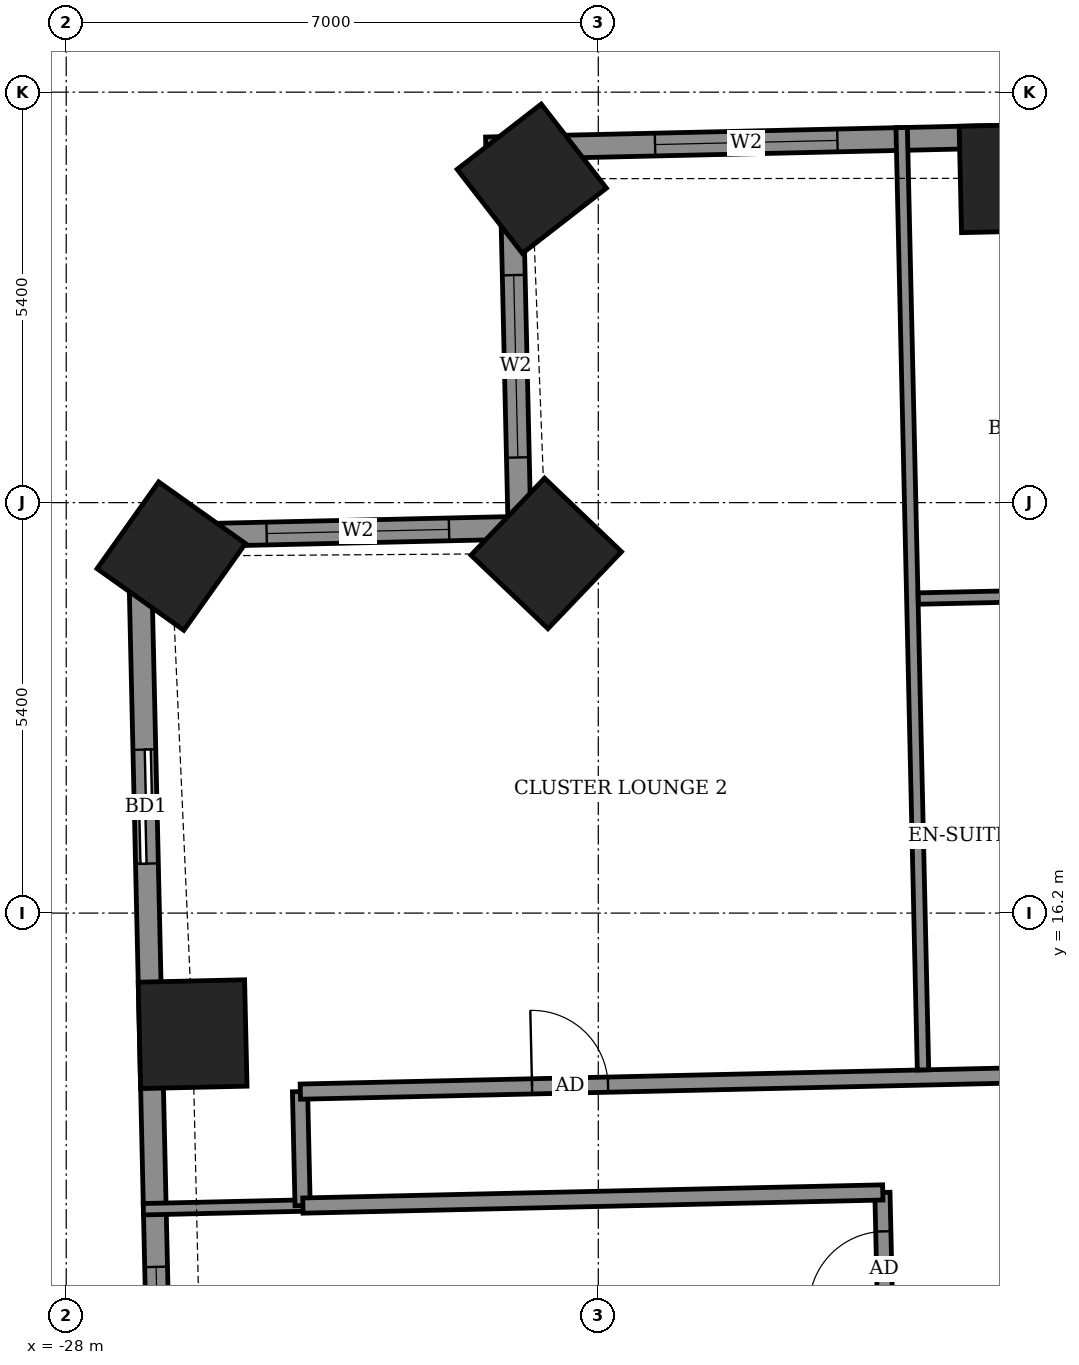
"""IFC4 building model, lengths in metres.
Left out: names, types, materials, properties, quantities, classifications, styles, units other than length and angle.
Written with IfcOpenShell. Run it as: python <this file> out.ifc"""

import sys

from ifc_helpers import new_model, si_unit, direction, frame, frame_2d, origin, origin_2d, place, context, subcontext, project, spatial, rectangle, extrude, element, fill, save


model = new_model("IFC4")
c1 = context("Model", 3, precision=1e-05, world=origin(), true_north=direction((0.0, 1.0)))
c2 = subcontext(c1, "Body", "Model", "MODEL_VIEW")
j1 = project(units=[si_unit("LENGTHUNIT", "METRE"), si_unit("PLANEANGLEUNIT", "RADIAN")], contexts=[c1])
p1 = place(None, origin())
s1 = spatial("IfcSite", under=j1, at=p1, CompositionType="ELEMENT")
p2 = place(p1, origin())
s2 = spatial("IfcBuilding", under=s1, at=p2, CompositionType="ELEMENT")
p3 = place(p2, frame((0.0, 0.0, 93.7)))
s3 = spatial("IfcBuildingStorey", under=s2, at=p3, CompositionType="ELEMENT", Elevation=93.7)
for number, where, z_axis, x_axis in (
    (1, (-15.537, 25.867, -0.55), (0.0, 0.0, 1.0), (-1.0, -0.023, 0.0)),
    (2, (-21.875, 25.861, -0.55), (0.0, 0.0, 1.0), (-0.79, -0.613, 0.0)),
    (3, (-21.685, 20.931, -0.55), (0.0, 0.0, 1.0), (-0.691, -0.723, 0.0)),
    (4, (-26.618, 20.897, -0.55), (0.0, 0.0, 1.0), (-0.579, -0.815, 0.0)),
    (5, (-26.337, 14.607, -0.55), (0.0, 0.0, 1.0), (0.023, -1.0, 0.0)),
):
    element("IfcColumn", number, at=place(p3, frame(where, z_axis=z_axis, x_axis=x_axis)), inside=s3, PredefinedType="COLUMN", context=c2, shape_type="SweptSolid", body=[
        extrude(rectangle(XDim=1.4, YDim=1.4, at=origin_2d()), origin(), (0.0, 0.0, 1.0), 3.6),
    ])
p4 = place(p3, frame((24.809, 27.333, 0.0), z_axis=(0.0, 0.0, 1.0), x_axis=(-0.999742676884, -0.022684356233, 0.0)))
e6 = element("IfcWall", 6, at=p4, inside=s3, PredefinedType="SOLIDWALL", context=c2, shape_type="SweptSolid", body=[
    extrude(rectangle(XDim=47.301, YDim=0.3, at=frame_2d((23.651, 0.0))), origin(), (0.0, 0.0, 1.0), 3.05),
])
p5 = place(p4, frame((1.311, 0.0, 0.0)))
e7 = element("IfcOpeningElement", 7, at=p5, cuts=e6, PredefinedType="OPENING", context=c2, shape_type="SweptSolid", body=[
    extrude(rectangle(XDim=1.2, YDim=2.4, at=frame_2d((0.6, 1.2))), frame((0.0, 0.16, 0.0), z_axis=(0.0, -1.0, 0.0), x_axis=(1.0, 0.0, 0.0)), (0.0, 0.0, 1.0), 0.32),
])
p6 = place(p4, frame((3.763, 0.0, 0.0)))
e8 = element("IfcOpeningElement", 8, at=p6, cuts=e6, PredefinedType="OPENING", context=c2, shape_type="SweptSolid", body=[
    extrude(rectangle(XDim=1.5, YDim=2.4, at=frame_2d((0.75, 1.2))), frame((0.0, 0.16, 0.0), z_axis=(0.0, -1.0, 0.0), x_axis=(1.0, 0.0, 0.0)), (0.0, 0.0, 1.0), 0.32),
])
p7 = place(p4, frame((8.647, 0.0, 0.0)))
e9 = element("IfcOpeningElement", 9, at=p7, cuts=e6, PredefinedType="OPENING", context=c2, shape_type="SweptSolid", body=[
    extrude(rectangle(XDim=1.5, YDim=2.4, at=frame_2d((0.75, 1.2))), frame((0.0, 0.16, 0.0), z_axis=(0.0, -1.0, 0.0), x_axis=(1.0, 0.0, 0.0)), (0.0, 0.0, 1.0), 0.32),
])
p8 = place(p4, frame((14.239, 0.0, 0.0)))
e10 = element("IfcOpeningElement", 10, at=p8, cuts=e6, PredefinedType="OPENING", context=c2, shape_type="SweptSolid", body=[
    extrude(rectangle(XDim=1.2, YDim=2.4, at=frame_2d((0.6, 1.2))), frame((0.0, 0.16, 0.0), z_axis=(0.0, -1.0, 0.0), x_axis=(1.0, 0.0, 0.0)), (0.0, 0.0, 1.0), 0.32),
])
p9 = place(p4, frame((17.016, 0.0, 0.0)))
e11 = element("IfcOpeningElement", 11, at=p9, cuts=e6, PredefinedType="OPENING", context=c2, shape_type="SweptSolid", body=[
    extrude(rectangle(XDim=1.5, YDim=2.4, at=frame_2d((0.75, 1.2))), frame((0.0, 0.16, 0.0), z_axis=(0.0, -1.0, 0.0), x_axis=(1.0, 0.0, 0.0)), (0.0, 0.0, 1.0), 0.32),
])
p10 = place(p4, frame((21.816, 0.0, 0.0)))
e12 = element("IfcOpeningElement", 12, at=p10, cuts=e6, PredefinedType="OPENING", context=c2, shape_type="SweptSolid", body=[
    extrude(rectangle(XDim=1.5, YDim=2.4, at=frame_2d((0.75, 1.2))), frame((0.0, 0.16, 0.0), z_axis=(0.0, -1.0, 0.0), x_axis=(1.0, 0.0, 0.0)), (0.0, 0.0, 1.0), 0.32),
])
p11 = place(p4, frame((24.817, 0.0, 0.0)))
e13 = element("IfcOpeningElement", 13, at=p11, cuts=e6, PredefinedType="OPENING", context=c2, shape_type="SweptSolid", body=[
    extrude(rectangle(XDim=1.2, YDim=2.4, at=frame_2d((0.6, 1.2))), frame((0.0, 0.16, 0.0), z_axis=(0.0, -1.0, 0.0), x_axis=(1.0, 0.0, 0.0)), (0.0, 0.0, 1.0), 0.32),
])
p12 = place(p4, frame((30.244, 0.0, 0.0)))
e14 = element("IfcOpeningElement", 14, at=p12, cuts=e6, PredefinedType="OPENING", context=c2, shape_type="SweptSolid", body=[
    extrude(rectangle(XDim=1.5, YDim=2.4, at=frame_2d((0.75, 1.2))), frame((0.0, 0.16, 0.0), z_axis=(0.0, -1.0, 0.0), x_axis=(1.0, 0.0, 0.0)), (0.0, 0.0, 1.0), 0.32),
])
p13 = place(p4, frame((35.069, 0.0, 0.0)))
e15 = element("IfcOpeningElement", 15, at=p13, cuts=e6, PredefinedType="OPENING", context=c2, shape_type="SweptSolid", body=[
    extrude(rectangle(XDim=1.5, YDim=2.4, at=frame_2d((0.75, 1.2))), frame((0.0, 0.16, 0.0), z_axis=(0.0, -1.0, 0.0), x_axis=(1.0, 0.0, 0.0)), (0.0, 0.0, 1.0), 0.32),
])
p14 = place(p4, frame((37.995, 0.0, 0.0)))
e16 = element("IfcOpeningElement", 16, at=p14, cuts=e6, PredefinedType="OPENING", context=c2, shape_type="SweptSolid", body=[
    extrude(rectangle(XDim=1.5, YDim=2.4, at=frame_2d((0.75, 1.2))), frame((0.0, 0.16, 0.0), z_axis=(0.0, -1.0, 0.0), x_axis=(1.0, 0.0, 0.0)), (0.0, 0.0, 1.0), 0.32),
])
p15 = place(p4, frame((42.674, 0.0, 0.9)))
e17 = element("IfcOpeningElement", 17, at=p15, cuts=e6, PredefinedType="OPENING", context=c2, shape_type="SweptSolid", body=[
    extrude(rectangle(XDim=2.4, YDim=1.5, at=frame_2d((1.2, 0.75))), frame((0.0, 0.16, 0.0), z_axis=(0.0, -1.0, 0.0), x_axis=(1.0, 0.0, 0.0)), (0.0, 0.0, 1.0), 0.32),
])
p16 = place(p3, frame((-22.151, 26.267, 0.0), z_axis=(0.0, 0.0, 1.0), x_axis=(0.022756903044, -0.999741028149, 0.0)))
e18 = element("IfcWall", 18, at=p16, inside=s3, PredefinedType="SOLIDWALL", context=c2, shape_type="SweptSolid", body=[
    extrude(rectangle(XDim=4.999, YDim=0.3, at=frame_2d((2.5, 0.0))), origin(), (0.0, 0.0, 1.0), 2.55),
])
p17 = place(p16, frame((1.674, 0.0, 0.9)))
e19 = element("IfcOpeningElement", 19, at=p17, cuts=e18, PredefinedType="OPENING", context=c2, shape_type="SweptSolid", body=[
    extrude(rectangle(XDim=2.4, YDim=1.5, at=frame_2d((1.2, 0.75))), frame((0.0, 0.16, 0.0), z_axis=(0.0, -1.0, 0.0), x_axis=(1.0, 0.0, 0.0)), (0.0, 0.0, 1.0), 0.32),
])
p18 = place(p3, frame((-22.037, 21.269, 0.0), z_axis=(0.0, 0.0, 1.0), x_axis=(-0.999739992103, -0.022802372469, 0.0)))
e20 = element("IfcWall", 20, at=p18, inside=s3, PredefinedType="SOLIDWALL", context=c2, shape_type="SweptSolid", body=[
    extrude(rectangle(XDim=5.0, YDim=0.3, at=frame_2d((2.5, 0.0))), origin(), (0.0, 0.0, 1.0), 2.55),
])
p19 = place(p18, frame((0.927, 0.0, 0.9)))
e21 = element("IfcOpeningElement", 21, at=p19, cuts=e20, PredefinedType="OPENING", context=c2, shape_type="SweptSolid", body=[
    extrude(rectangle(XDim=2.4, YDim=1.5, at=frame_2d((1.2, 0.75))), frame((0.0, 0.16, 0.0), z_axis=(0.0, -1.0, 0.0), x_axis=(1.0, 0.0, 0.0)), (0.0, 0.0, 1.0), 0.32),
])
p20 = place(p3, frame((-27.036, 21.155, 0.0), z_axis=(0.0, 0.0, 1.0), x_axis=(0.022730142562, -0.999741636934, 0.0)))
e22 = element("IfcWall", 22, at=p20, inside=s3, PredefinedType="SOLIDWALL", context=c2, shape_type="SweptSolid", body=[
    extrude(rectangle(XDim=13.329, YDim=0.3, at=frame_2d((6.665, 0.0))), origin(), (0.0, 0.0, 1.0), 3.05),
])
p21 = place(p20, frame((2.805, 0.0, 0.0)))
e23 = element("IfcOpeningElement", 23, at=p21, cuts=e22, PredefinedType="OPENING", context=c2, shape_type="SweptSolid", body=[
    extrude(rectangle(XDim=1.5, YDim=2.4, at=frame_2d((0.75, 1.2))), frame((0.0, 0.16, 0.0), z_axis=(0.0, -1.0, 0.0), x_axis=(1.0, 0.0, 0.0)), (0.0, 0.0, 1.0), 0.32),
])
p22 = place(p20, frame((9.612, 0.0, 0.9)))
e24 = element("IfcOpeningElement", 24, at=p22, cuts=e22, PredefinedType="OPENING", context=c2, shape_type="SweptSolid", body=[
    extrude(rectangle(XDim=2.4, YDim=1.5, at=frame_2d((1.2, 0.75))), frame((0.0, 0.16, 0.0), z_axis=(0.0, -1.0, 0.0), x_axis=(1.0, 0.0, 0.0)), (0.0, 0.0, 1.0), 0.32),
])
p23 = place(p3, frame((-16.684, -12.919, 0.0), z_axis=(0.0, 0.0, 1.0), x_axis=(-0.022706151961, 0.999742182097, 0.0)))
e25 = element("IfcWall", 25, at=p23, inside=s3, PredefinedType="PARTITIONING", context=c2, shape_type="SweptSolid", body=[
    extrude(rectangle(XDim=25.45, YDim=0.2, at=frame_2d((12.725, 0.0))), origin(), (0.0, 0.0, 1.0), 3.05),
])
p24 = place(p23, frame((23.938, 0.0, 0.0)))
e26 = element("IfcOpeningElement", 26, at=p24, cuts=e25, PredefinedType="OPENING", context=c2, shape_type="SweptSolid", body=[
    extrude(rectangle(XDim=1.0, YDim=2.1, at=frame_2d((0.5, 1.05))), frame((0.0, 0.11, 0.0), z_axis=(0.0, -1.0, 0.0), x_axis=(1.0, 0.0, 0.0)), (0.0, 0.0, 1.0), 0.22),
])
p25 = place(p23, frame((21.775, 0.0, 0.0)))
e27 = element("IfcOpeningElement", 27, at=p25, cuts=e25, PredefinedType="OPENING", context=c2, shape_type="SweptSolid", body=[
    extrude(rectangle(XDim=0.9, YDim=2.1, at=frame_2d((0.45, 1.05))), frame((0.0, 0.11, 0.0), z_axis=(0.0, -1.0, 0.0), x_axis=(1.0, 0.0, 0.0)), (0.0, 0.0, 1.0), 0.22),
])
p26 = place(p23, frame((16.975, 0.0, 0.0)))
e28 = element("IfcOpeningElement", 28, at=p26, cuts=e25, PredefinedType="OPENING", context=c2, shape_type="SweptSolid", body=[
    extrude(rectangle(XDim=1.0, YDim=2.1, at=frame_2d((0.5, 1.05))), frame((0.0, 0.11, 0.0), z_axis=(0.0, -1.0, 0.0), x_axis=(1.0, 0.0, 0.0)), (0.0, 0.0, 1.0), 0.22),
])
p27 = place(p23, frame((19.275, 0.0, 0.0)))
e29 = element("IfcOpeningElement", 29, at=p27, cuts=e25, PredefinedType="OPENING", context=c2, shape_type="SweptSolid", body=[
    extrude(rectangle(XDim=0.9, YDim=2.1, at=frame_2d((0.45, 1.05))), frame((0.0, 0.11, 0.0), z_axis=(0.0, -1.0, 0.0), x_axis=(1.0, 0.0, 0.0)), (0.0, 0.0, 1.0), 0.22),
])
p28 = place(p23, frame((15.075, 0.0, 0.0)))
e30 = element("IfcOpeningElement", 30, at=p28, cuts=e25, PredefinedType="OPENING", context=c2, shape_type="SweptSolid", body=[
    extrude(rectangle(XDim=1.0, YDim=2.1, at=frame_2d((0.5, 1.05))), frame((0.0, 0.11, 0.0), z_axis=(0.0, -1.0, 0.0), x_axis=(1.0, 0.0, 0.0)), (0.0, 0.0, 1.0), 0.22),
])
p29 = place(p23, frame((12.975, 0.0, 0.0)))
e31 = element("IfcOpeningElement", 31, at=p29, cuts=e25, PredefinedType="OPENING", context=c2, shape_type="SweptSolid", body=[
    extrude(rectangle(XDim=0.9, YDim=2.1, at=frame_2d((0.45, 1.05))), frame((0.0, 0.11, 0.0), z_axis=(0.0, -1.0, 0.0), x_axis=(1.0, 0.0, 0.0)), (0.0, 0.0, 1.0), 0.22),
])
p30 = place(p23, frame((10.55, 0.0, 0.0)))
e32 = element("IfcOpeningElement", 32, at=p30, cuts=e25, PredefinedType="OPENING", context=c2, shape_type="SweptSolid", body=[
    extrude(rectangle(XDim=1.0, YDim=2.1, at=frame_2d((0.5, 1.05))), frame((0.0, 0.11, 0.0), z_axis=(0.0, -1.0, 0.0), x_axis=(1.0, 0.0, 0.0)), (0.0, 0.0, 1.0), 0.22),
])
p31 = place(p23, frame((8.125, 0.0, 0.0)))
e33 = element("IfcOpeningElement", 33, at=p31, cuts=e25, PredefinedType="OPENING", context=c2, shape_type="SweptSolid", body=[
    extrude(rectangle(XDim=0.9, YDim=2.1, at=frame_2d((0.45, 1.05))), frame((0.0, 0.11, 0.0), z_axis=(0.0, -1.0, 0.0), x_axis=(1.0, 0.0, 0.0)), (0.0, 0.0, 1.0), 0.22),
])
p32 = place(p23, frame((1.737, 0.0, 0.0)))
e34 = element("IfcOpeningElement", 34, at=p32, cuts=e25, PredefinedType="OPENING", context=c2, shape_type="SweptSolid", body=[
    extrude(rectangle(XDim=1.0, YDim=2.1, at=frame_2d((0.5, 1.05))), frame((0.0, 0.11, 0.0), z_axis=(0.0, -1.0, 0.0), x_axis=(1.0, 0.0, 0.0)), (0.0, 0.0, 1.0), 0.22),
])
p33 = place(p23, frame((5.425, 0.0, 0.0)))
e35 = element("IfcOpeningElement", 35, at=p33, cuts=e25, PredefinedType="OPENING", context=c2, shape_type="SweptSolid", body=[
    extrude(rectangle(XDim=0.9, YDim=2.1, at=frame_2d((0.45, 1.05))), frame((0.0, 0.11, 0.0), z_axis=(0.0, -1.0, 0.0), x_axis=(1.0, 0.0, 0.0)), (0.0, 0.0, 1.0), 0.22),
])
p34 = place(p3, frame((-26.985, 12.304, 0.0), z_axis=(0.0, 0.0, 1.0), x_axis=(0.999738589876, 0.02286376854, 0.0)))
e36 = element("IfcWall", 36, at=p34, inside=s3, PredefinedType="PARTITIONING", context=c2, shape_type="SweptSolid", body=[
    extrude(rectangle(XDim=2.104, YDim=0.15, at=frame_2d((1.052, 0.0))), origin(), (0.0, 0.0, 1.0), 2.55),
])
p35 = place(p3, frame((-24.89, 12.352, 0.0), z_axis=(0.0, 0.0, 1.0), x_axis=(-0.02279537805, 0.999740151609, 0.0)))
e37 = element("IfcWall", 37, at=p35, inside=s3, PredefinedType="PARTITIONING", context=c2, shape_type="SweptSolid", body=[
    extrude(rectangle(XDim=1.5, YDim=0.2, at=frame_2d((0.75, 0.0))), origin(), (0.0, 0.0, 1.0), 3.05),
])
p36 = place(p3, frame((-24.886, 12.352, 0.0), z_axis=(0.0, 0.0, 1.0), x_axis=(0.999743418763, 0.0226516366, 0.0)))
e38 = element("IfcWall", 38, at=p36, inside=s3, PredefinedType="PARTITIONING", context=c2, shape_type="SweptSolid", body=[
    extrude(rectangle(XDim=7.631, YDim=0.2, at=frame_2d((3.815, 0.0))), origin(), (0.0, 0.0, 1.0), 3.05),
])
p37 = place(p3, frame((-24.92, 13.851, 0.0), z_axis=(0.0, 0.0, 1.0), x_axis=(0.999742411711, 0.022696039895, 0.0)))
e39 = element("IfcWall", 39, at=p37, inside=s3, PredefinedType="PARTITIONING", context=c2, shape_type="SweptSolid", body=[
    extrude(rectangle(XDim=52.472, YDim=0.2, at=frame_2d((26.236, 0.0))), origin(), (0.0, 0.0, 1.0), 3.05),
])
p38 = place(p37, frame((50.088, 0.0, 0.0)))
e40 = element("IfcOpeningElement", 40, at=p38, cuts=e39, PredefinedType="OPENING", context=c2, shape_type="SweptSolid", body=[
    extrude(rectangle(XDim=1.0, YDim=2.1, at=frame_2d((0.5, 1.05))), frame((0.0, 0.11, 0.0), z_axis=(0.0, -1.0, 0.0), x_axis=(1.0, 0.0, 0.0)), (0.0, 0.0, 1.0), 0.22),
])
p39 = place(p37, frame((45.725, 0.0, 0.0)))
e41 = element("IfcOpeningElement", 41, at=p39, cuts=e39, PredefinedType="OPENING", context=c2, shape_type="SweptSolid", body=[
    extrude(rectangle(XDim=0.9, YDim=2.1, at=frame_2d((0.45, 1.05))), frame((0.0, 0.11, 0.0), z_axis=(0.0, -1.0, 0.0), x_axis=(1.0, 0.0, 0.0)), (0.0, 0.0, 1.0), 0.22),
])
p40 = place(p37, frame((38.975, 0.0, 0.0)))
e42 = element("IfcOpeningElement", 42, at=p40, cuts=e39, PredefinedType="OPENING", context=c2, shape_type="SweptSolid", body=[
    extrude(rectangle(XDim=0.9, YDim=2.1, at=frame_2d((0.45, 1.05))), frame((0.0, 0.11, 0.0), z_axis=(0.0, -1.0, 0.0), x_axis=(1.0, 0.0, 0.0)), (0.0, 0.0, 1.0), 0.22),
])
p41 = place(p37, frame((37.05, 0.0, 0.0)))
e43 = element("IfcOpeningElement", 43, at=p41, cuts=e39, PredefinedType="OPENING", context=c2, shape_type="SweptSolid", body=[
    extrude(rectangle(XDim=0.9, YDim=2.1, at=frame_2d((0.45, 1.05))), frame((0.0, 0.11, 0.0), z_axis=(0.0, -1.0, 0.0), x_axis=(1.0, 0.0, 0.0)), (0.0, 0.0, 1.0), 0.22),
])
p42 = place(p37, frame((30.35, 0.0, 0.0)))
e44 = element("IfcOpeningElement", 44, at=p42, cuts=e39, PredefinedType="OPENING", context=c2, shape_type="SweptSolid", body=[
    extrude(rectangle(XDim=0.9, YDim=2.1, at=frame_2d((0.45, 1.05))), frame((0.0, 0.11, 0.0), z_axis=(0.0, -1.0, 0.0), x_axis=(1.0, 0.0, 0.0)), (0.0, 0.0, 1.0), 0.22),
])
p43 = place(p37, frame((28.4, 0.0, 0.0)))
e45 = element("IfcOpeningElement", 45, at=p43, cuts=e39, PredefinedType="OPENING", context=c2, shape_type="SweptSolid", body=[
    extrude(rectangle(XDim=0.9, YDim=2.1, at=frame_2d((0.45, 1.05))), frame((0.0, 0.11, 0.0), z_axis=(0.0, -1.0, 0.0), x_axis=(1.0, 0.0, 0.0)), (0.0, 0.0, 1.0), 0.22),
])
p44 = place(p37, frame((21.675, 0.0, 0.0)))
e46 = element("IfcOpeningElement", 46, at=p44, cuts=e39, PredefinedType="OPENING", context=c2, shape_type="SweptSolid", body=[
    extrude(rectangle(XDim=0.9, YDim=2.1, at=frame_2d((0.45, 1.05))), frame((0.0, 0.11, 0.0), z_axis=(0.0, -1.0, 0.0), x_axis=(1.0, 0.0, 0.0)), (0.0, 0.0, 1.0), 0.22),
])
p45 = place(p37, frame((19.775, 0.0, 0.0)))
e47 = element("IfcOpeningElement", 47, at=p45, cuts=e39, PredefinedType="OPENING", context=c2, shape_type="SweptSolid", body=[
    extrude(rectangle(XDim=0.9, YDim=2.1, at=frame_2d((0.45, 1.05))), frame((0.0, 0.11, 0.0), z_axis=(0.0, -1.0, 0.0), x_axis=(1.0, 0.0, 0.0)), (0.0, 0.0, 1.0), 0.22),
])
p46 = place(p37, frame((13.0, 0.0, 0.0)))
e48 = element("IfcOpeningElement", 48, at=p46, cuts=e39, PredefinedType="OPENING", context=c2, shape_type="SweptSolid", body=[
    extrude(rectangle(XDim=0.9, YDim=2.1, at=frame_2d((0.45, 1.05))), frame((0.0, 0.11, 0.0), z_axis=(0.0, -1.0, 0.0), x_axis=(1.0, 0.0, 0.0)), (0.0, 0.0, 1.0), 0.22),
])
p47 = place(p37, frame((11.075, 0.0, 0.0)))
e49 = element("IfcOpeningElement", 49, at=p47, cuts=e39, PredefinedType="OPENING", context=c2, shape_type="SweptSolid", body=[
    extrude(rectangle(XDim=0.9, YDim=2.1, at=frame_2d((0.45, 1.05))), frame((0.0, 0.11, 0.0), z_axis=(0.0, -1.0, 0.0), x_axis=(1.0, 0.0, 0.0)), (0.0, 0.0, 1.0), 0.22),
])
p48 = place(p37, frame((3.049, 0.0, 0.0)))
e50 = element("IfcOpeningElement", 50, at=p48, cuts=e39, PredefinedType="OPENING", context=c2, shape_type="SweptSolid", body=[
    extrude(rectangle(XDim=1.0, YDim=2.1, at=frame_2d((0.5, 1.05))), frame((0.0, 0.11, 0.0), z_axis=(0.0, -1.0, 0.0), x_axis=(1.0, 0.0, 0.0)), (0.0, 0.0, 1.0), 0.22),
])
p49 = place(p3, frame((-16.728, 14.137, 0.0), z_axis=(0.0, 0.0, 1.0), x_axis=(-0.022661475803, 0.999743195783, 0.0)))
e51 = element("IfcWall", 51, at=p49, inside=s3, PredefinedType="PARTITIONING", context=c2, shape_type="SweptSolid", body=[
    extrude(rectangle(XDim=12.4, YDim=0.15, at=frame_2d((6.2, 0.0))), origin(), (0.0, 0.0, 1.0), 2.55),
])
p50 = place(p3, frame((-16.79, 20.338, 0.0), z_axis=(0.0, 0.0, 1.0), x_axis=(0.999749954681, 0.022361308448, 0.0)))
e52 = element("IfcWall", 52, at=p50, inside=s3, PredefinedType="PARTITIONING", context=c2, shape_type="SweptSolid", body=[
    extrude(rectangle(XDim=2.325, YDim=0.15, at=frame_2d((1.163, 0.0))), origin(), (0.0, 0.0, 1.0), 3.05),
])
p51 = place(p15, origin())
e53 = element("IfcWindow", 53, at=p51, inside=s3, PartitioningType="DOUBLE_PANEL_VERTICAL", PredefinedType="WINDOW", context=c2, shape_type="SweptSolid", body=[
    extrude(rectangle(XDim=2.4, YDim=1.5, at=frame_2d((1.2, 0.75))), frame((0.0, 0.03, 0.0), z_axis=(0.0, -1.0, 0.0), x_axis=(1.0, 0.0, 0.0)), (0.0, 0.0, 1.0), 0.06),
])
fill(e17, e53)
p52 = place(p17, origin())
e54 = element("IfcWindow", 54, at=p52, inside=s3, PartitioningType="DOUBLE_PANEL_VERTICAL", PredefinedType="WINDOW", context=c2, shape_type="SweptSolid", body=[
    extrude(rectangle(XDim=2.4, YDim=1.5, at=frame_2d((1.2, 0.75))), frame((0.0, 0.03, 0.0), z_axis=(0.0, -1.0, 0.0), x_axis=(1.0, 0.0, 0.0)), (0.0, 0.0, 1.0), 0.06),
])
fill(e19, e54)
p53 = place(p19, origin())
e55 = element("IfcWindow", 55, at=p53, inside=s3, PartitioningType="DOUBLE_PANEL_VERTICAL", PredefinedType="WINDOW", context=c2, shape_type="SweptSolid", body=[
    extrude(rectangle(XDim=2.4, YDim=1.5, at=frame_2d((1.2, 0.75))), frame((0.0, 0.03, 0.0), z_axis=(0.0, -1.0, 0.0), x_axis=(1.0, 0.0, 0.0)), (0.0, 0.0, 1.0), 0.06),
])
fill(e21, e55)
p54 = place(p21, origin())
e56 = element("IfcDoor", 56, at=p54, inside=s3, OperationType="SLIDING_TO_LEFT", PredefinedType="DOOR", context=c2, shape_type="SweptSolid", body=[
    extrude(rectangle(XDim=1.5, YDim=2.4, at=frame_2d((0.75, 1.2))), frame((0.0, 0.025, 0.0), z_axis=(0.0, -1.0, 0.0), x_axis=(1.0, 0.0, 0.0)), (0.0, 0.0, 1.0), 0.05),
])
fill(e23, e56)
p55 = place(p22, origin())
e57 = element("IfcWindow", 57, at=p55, inside=s3, PartitioningType="DOUBLE_PANEL_VERTICAL", PredefinedType="WINDOW", context=c2, shape_type="SweptSolid", body=[
    extrude(rectangle(XDim=2.4, YDim=1.5, at=frame_2d((1.2, 0.75))), frame((0.0, 0.03, 0.0), z_axis=(0.0, -1.0, 0.0), x_axis=(1.0, 0.0, 0.0)), (0.0, 0.0, 1.0), 0.06),
])
fill(e24, e57)
p56 = place(p48, origin())
e58 = element("IfcDoor", 58, at=p56, inside=s3, OperationType="SINGLE_SWING_RIGHT", PredefinedType="DOOR", context=c2, shape_type="SweptSolid", body=[
    extrude(rectangle(XDim=1.0, YDim=2.1, at=frame_2d((0.5, 1.05))), frame((0.0, 0.025, 0.0), z_axis=(0.0, -1.0, 0.0), x_axis=(1.0, 0.0, 0.0)), (0.0, 0.0, 1.0), 0.05),
])
fill(e50, e58)
p57 = place(p24, origin())
e59 = element("IfcDoor", 59, at=p57, inside=s3, OperationType="SINGLE_SWING_LEFT", PredefinedType="DOOR", context=c2, shape_type="SweptSolid", body=[
    extrude(rectangle(XDim=1.0, YDim=2.1, at=frame_2d((0.5, 1.05))), frame((0.0, 0.025, 0.0), z_axis=(0.0, -1.0, 0.0), x_axis=(1.0, 0.0, 0.0)), (0.0, 0.0, 1.0), 0.05),
])
fill(e26, e59)
save(model, sys.argv[1])
